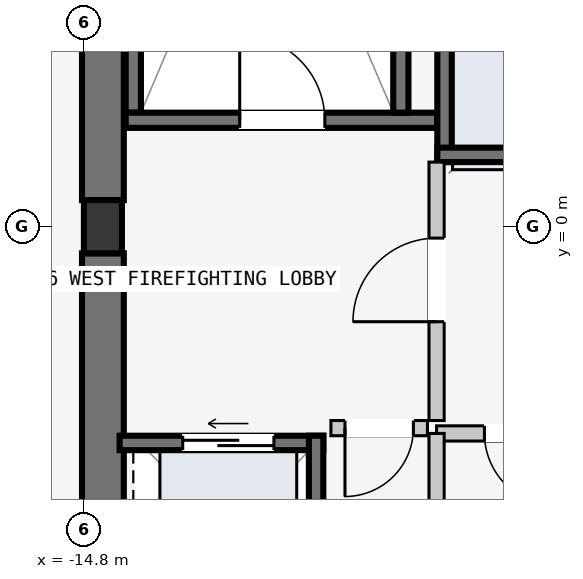
"""IFC4 building model, lengths in metres.
Left out: names, types, materials, properties, quantities, classifications, styles, units other than length and angle.
Written with IfcOpenShell. Run it as: python <this file> out.ifc"""

import sys

from ifc_helpers import new_model, si_unit, direction, frame, frame_2d, origin, origin_2d, place, context, subcontext, project, spatial, rectangle, i_section, extrude, element, fill, save


model = new_model("IFC4")
c1 = context("Model", 3, precision=1e-05, world=origin(), true_north=direction((0.0, 1.0)))
c2 = subcontext(c1, "Body", "Model", "MODEL_VIEW")
j1 = project(units=[si_unit("LENGTHUNIT", "METRE"), si_unit("PLANEANGLEUNIT", "RADIAN")], contexts=[c1])
p1 = place(None, origin())
s1 = spatial("IfcSite", under=j1, at=p1, CompositionType="ELEMENT")
p2 = place(p1, origin())
s2 = spatial("IfcBuilding", under=s1, at=p2, CompositionType="ELEMENT")
p3 = place(p2, frame((0.0, 0.0, 27.6)))
s3 = spatial("IfcBuildingStorey", under=s2, at=p3, CompositionType="ELEMENT", Elevation=27.6)
for number, where, z_axis, x_axis in (
    (1, (-14.55, -9.4, -0.2), (0.0, 0.0, 1.0), (0.0, 1.0, 0.0)),
    (2, (-14.55, 0.35, -0.2), (0.0, 0.0, 1.0), (0.0, 1.0, 0.0)),
):
    element("IfcWall", number, at=place(p3, frame(where, z_axis=z_axis, x_axis=x_axis)), inside=s3, PredefinedType="SHEAR", context=c2, shape_type="SweptSolid", body=[
        extrude(rectangle(XDim=9.05, YDim=0.55, at=frame_2d((4.525, 0.0))), origin(), (0.0, 0.0, 1.0), 3.6),
    ])
p4 = place(p3, frame((-14.15, 1.5, -0.2), z_axis=(0.0, 0.0, 1.0), x_axis=(0.0, 1.0, 0.0)))
e3 = element("IfcWall", 3, at=p4, inside=s3, PredefinedType="SOLIDWALL", context=c2, shape_type="SweptSolid", body=[
    extrude(rectangle(XDim=7.8, YDim=0.2, at=frame_2d((3.9, 0.0))), origin(), (0.0, 0.0, 1.0), 3.6),
])
p5 = place(p3, frame((-14.25, 1.4, -0.2), z_axis=(0.0, 0.0, 1.0), x_axis=(1.0, 0.0, 0.0)))
e4 = element("IfcWall", 4, at=p5, inside=s3, PredefinedType="SOLIDWALL", context=c2, shape_type="SweptSolid", body=[
    extrude(rectangle(XDim=4.1, YDim=0.2, at=frame_2d((2.05, 0.0))), origin(), (0.0, 0.0, 1.0), 3.6),
])
p6 = place(p5, frame((1.5, 0.0, 0.2)))
e5 = element("IfcOpeningElement", 5, at=p6, cuts=e4, PredefinedType="OPENING", context=c2, shape_type="SweptSolid", body=[
    extrude(rectangle(XDim=1.12, YDim=2.18, at=frame_2d((0.56, 1.09))), frame((0.0, 0.11, 0.0), z_axis=(0.0, -1.0, 0.0), x_axis=(1.0, 0.0, 0.0)), (0.0, 0.0, 1.0), 0.22),
])
p7 = place(p3, frame((-10.63, 1.5, -0.2), z_axis=(0.0, 0.0, 1.0), x_axis=(0.0, 1.0, 0.0)))
e6 = element("IfcWall", 6, at=p7, inside=s3, PredefinedType="SOLIDWALL", context=c2, shape_type="SweptSolid", body=[
    extrude(rectangle(XDim=7.8, YDim=0.2, at=frame_2d((3.9, 0.0))), origin(), (0.0, 0.0, 1.0), 3.6),
])
p8 = place(p3, frame((-14.55, 0.0, 0.0), z_axis=(0.0, 0.0, 1.0), x_axis=(1.0, 0.0, 0.0)))
e7 = element("IfcColumn", 7, at=p8, inside=s3, PredefinedType="COLUMN", context=c2, shape_type="SweptSolid", body=[
    extrude(i_section(OverallWidth=0.5, OverallDepth=0.7, WebThickness=0.028, FlangeThickness=0.045, at=origin_2d()), origin(), (0.0, 0.0, 1.0), 3.6),
])
p9 = place(p3, frame((-10.055, 0.85, -0.2), z_axis=(0.0, 0.0, 1.0), x_axis=(0.0, 1.0, 0.0)))
e8 = element("IfcWall", 8, at=p9, inside=s3, PredefinedType="SOLIDWALL", context=c2, shape_type="SweptSolid", body=[
    extrude(rectangle(XDim=1.9, YDim=0.19, at=frame_2d((0.95, 0.0))), origin(), (0.0, 0.0, 1.0), 3.6),
])
p10 = place(p3, frame((-10.15, 0.945, -0.2), z_axis=(0.0, 0.0, 1.0), x_axis=(1.0, 0.0, 0.0)))
e9 = element("IfcWall", 9, at=p10, inside=s3, PredefinedType="SOLIDWALL", context=c2, shape_type="SweptSolid", body=[
    extrude(rectangle(XDim=2.2, YDim=0.19, at=frame_2d((1.1, 0.0))), origin(), (0.0, 0.0, 1.0), 3.6),
])
p11 = place(p3, frame((-14.33, -2.845, -0.2), z_axis=(0.0, 0.0, 1.0), x_axis=(1.0, 0.0, 0.0)))
e10 = element("IfcWall", 10, at=p11, inside=s3, PredefinedType="SOLIDWALL", context=c2, shape_type="SweptSolid", body=[
    extrude(rectangle(XDim=2.68, YDim=0.19, at=frame_2d((1.34, 0.0))), origin(), (0.0, 0.0, 1.0), 3.6),
])
p12 = place(p11, frame((0.83, 0.0, 0.2)))
e11 = element("IfcOpeningElement", 11, at=p12, cuts=e10, PredefinedType="OPENING", context=c2, shape_type="SweptSolid", body=[
    extrude(rectangle(XDim=1.2, YDim=2.2, at=frame_2d((0.6, 1.1))), frame((0.0, 0.105, 0.0), z_axis=(0.0, -1.0, 0.0), x_axis=(1.0, 0.0, 0.0)), (0.0, 0.0, 1.0), 0.21),
])
p13 = place(p3, frame((-11.745, -5.35, -0.2), z_axis=(0.0, 0.0, 1.0), x_axis=(0.0, 1.0, 0.0)))
e12 = element("IfcWall", 12, at=p13, inside=s3, PredefinedType="SOLIDWALL", context=c2, shape_type="SweptSolid", body=[
    extrude(rectangle(XDim=2.6, YDim=0.19, at=frame_2d((1.3, 0.0))), origin(), (0.0, 0.0, 1.0), 3.6),
])
p14 = place(p3, frame((-10.16, -2.55, 0.0), z_axis=(0.0, 0.0, 1.0), x_axis=(0.0, 1.0, 0.0)))
e13 = element("IfcWall", 13, at=p14, inside=s3, PredefinedType="PARTITIONING", context=c2, shape_type="SweptSolid", body=[
    extrude(rectangle(XDim=3.4, YDim=0.2, at=frame_2d((1.7, 0.0))), origin(), (0.0, 0.0, 1.0), 3.4),
])
p15 = place(p14, frame((1.3, 0.0, 0.0)))
e14 = element("IfcOpeningElement", 14, at=p15, cuts=e13, PredefinedType="OPENING", context=c2, shape_type="SweptSolid", body=[
    extrude(rectangle(XDim=1.1, YDim=2.15, at=frame_2d((0.55, 1.075))), frame((0.0, 0.11, 0.0), z_axis=(0.0, -1.0, 0.0), x_axis=(1.0, 0.0, 0.0)), (0.0, 0.0, 1.0), 0.22),
])
p16 = place(p3, frame((-10.28, -2.65, 0.0), z_axis=(0.0, 0.0, 1.0), x_axis=(-1.0, 0.0, 0.0)))
e15 = element("IfcWall", 15, at=p16, inside=s3, PredefinedType="PARTITIONING", context=c2, shape_type="SweptSolid", body=[
    extrude(rectangle(XDim=1.27, YDim=0.2, at=frame_2d((0.635, 0.0))), origin(), (0.0, 0.0, 1.0), 3.4),
])
p17 = place(p16, frame((0.185, 0.0, 0.0)))
e16 = element("IfcOpeningElement", 16, at=p17, cuts=e15, PredefinedType="OPENING", context=c2, shape_type="SweptSolid", body=[
    extrude(rectangle(XDim=0.9, YDim=2.15, at=frame_2d((0.45, 1.075))), frame((0.0, 0.11, 0.0), z_axis=(0.0, -1.0, 0.0), x_axis=(1.0, 0.0, 0.0)), (0.0, 0.0, 1.0), 0.22),
])
p18 = place(p3, frame((-7.96, -2.72, 0.0), z_axis=(0.0, 0.0, 1.0), x_axis=(-1.0, 0.0, 0.0)))
e17 = element("IfcWall", 17, at=p18, inside=s3, PredefinedType="PARTITIONING", context=c2, shape_type="SweptSolid", body=[
    extrude(rectangle(XDim=2.2, YDim=0.2, at=frame_2d((1.1, 0.0))), origin(), (0.0, 0.0, 1.0), 3.4),
])
p19 = place(p18, frame((0.62, 0.0, 0.0)))
e18 = element("IfcOpeningElement", 18, at=p19, cuts=e17, PredefinedType="OPENING", context=c2, shape_type="SweptSolid", body=[
    extrude(rectangle(XDim=0.95, YDim=2.1, at=frame_2d((0.475, 1.05))), frame((0.0, 0.11, 0.0), z_axis=(0.0, -1.0, 0.0), x_axis=(1.0, 0.0, 0.0)), (0.0, 0.0, 1.0), 0.22),
])
p20 = place(p3, frame((-10.16, -5.16, 0.0), z_axis=(0.0, 0.0, 1.0), x_axis=(0.0, 1.0, 0.0)))
e19 = element("IfcWall", 19, at=p20, inside=s3, PredefinedType="PARTITIONING", context=c2, shape_type="SweptSolid", body=[
    extrude(rectangle(XDim=2.44, YDim=0.2, at=frame_2d((1.22, 0.0))), origin(), (0.0, 0.0, 1.0), 3.4),
])
p21 = place(p6, origin())
e20 = element("IfcDoor", 20, at=p21, inside=s3, OperationType="SINGLE_SWING_LEFT", PredefinedType="DOOR", context=c2, shape_type="SweptSolid", body=[
    extrude(rectangle(XDim=1.12, YDim=2.18, at=frame_2d((0.56, 1.09))), frame((0.0, 0.025, 0.0), z_axis=(0.0, -1.0, 0.0), x_axis=(1.0, 0.0, 0.0)), (0.0, 0.0, 1.0), 0.05),
])
fill(e5, e20)
p22 = place(p12, origin())
e21 = element("IfcDoor", 21, at=p22, inside=s3, OperationType="SLIDING_TO_LEFT", PredefinedType="DOOR", context=c2, shape_type="SweptSolid", body=[
    extrude(rectangle(XDim=1.2, YDim=2.2, at=frame_2d((0.6, 1.1))), frame((0.0, 0.025, 0.0), z_axis=(0.0, -1.0, 0.0), x_axis=(1.0, 0.0, 0.0)), (0.0, 0.0, 1.0), 0.05),
])
fill(e11, e21)
p23 = place(p15, origin())
e22 = element("IfcDoor", 22, at=p23, inside=s3, OperationType="SINGLE_SWING_LEFT", PredefinedType="DOOR", context=c2, shape_type="SweptSolid", body=[
    extrude(rectangle(XDim=1.1, YDim=2.15, at=frame_2d((0.55, 1.075))), frame((0.0, 0.025, 0.0), z_axis=(0.0, -1.0, 0.0), x_axis=(1.0, 0.0, 0.0)), (0.0, 0.0, 1.0), 0.05),
])
fill(e14, e22)
p24 = place(p17, origin())
e23 = element("IfcDoor", 23, at=p24, inside=s3, OperationType="SINGLE_SWING_RIGHT", PredefinedType="DOOR", context=c2, shape_type="SweptSolid", body=[
    extrude(rectangle(XDim=0.9, YDim=2.15, at=frame_2d((0.45, 1.075))), frame((0.0, 0.025, 0.0), z_axis=(0.0, -1.0, 0.0), x_axis=(1.0, 0.0, 0.0)), (0.0, 0.0, 1.0), 0.05),
])
fill(e16, e23)
p25 = place(p19, origin())
e24 = element("IfcDoor", 24, at=p25, inside=s3, OperationType="SINGLE_SWING_LEFT", PredefinedType="DOOR", context=c2, shape_type="SweptSolid", body=[
    extrude(rectangle(XDim=0.95, YDim=2.1, at=frame_2d((0.475, 1.05))), frame((0.0, 0.025, 0.0), z_axis=(0.0, -1.0, 0.0), x_axis=(1.0, 0.0, 0.0)), (0.0, 0.0, 1.0), 0.05),
])
fill(e18, e24)
save(model, sys.argv[1])
